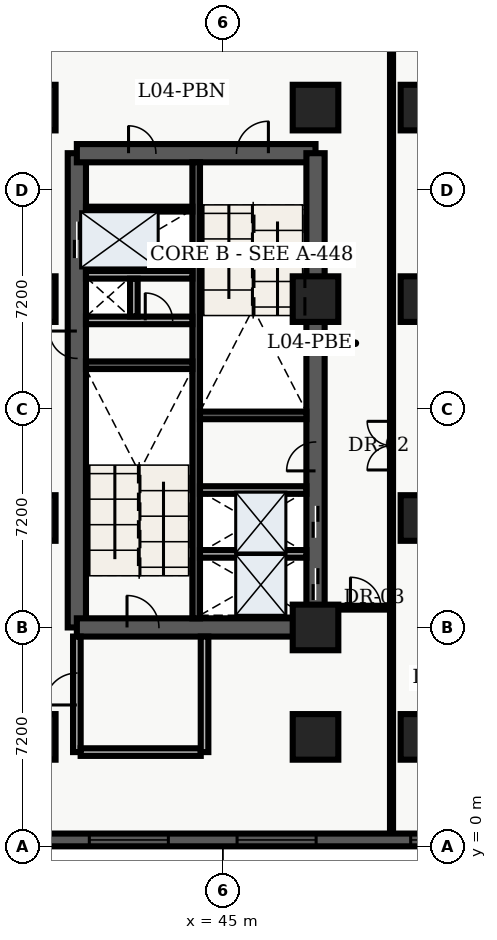
"""IFC4 building model, lengths in metres.
Left out: names, types, materials, properties, quantities, classifications, styles, units other than length and angle.
Written with IfcOpenShell. Run it as: python <this file> out.ifc"""

import sys

from ifc_helpers import new_model, entity, si_unit, converted_unit, direction, frame, origin_with_axes, origin_2d_with_axis, place, context, subcontext, project, spatial, polyline, rectangle, outline, extrude, element, fill, save


model = new_model("IFC4")
c1 = context("Model", 3, precision=1e-05, world=origin_with_axes(), true_north=direction((0.0, 1.0)))
c2 = subcontext(c1, "Body", "Model", "MODEL_VIEW")
j1 = project(units=[si_unit("LENGTHUNIT", "METRE"), converted_unit("PLANEANGLEUNIT", "DEGREE", entity("IfcPlaneAngleMeasure", 0.017), si_unit("PLANEANGLEUNIT", "RADIAN"), dimensions=[0, 0, 0, 0, 0, 0, 0])], contexts=[c1])
p1 = place(None, origin_with_axes())
s1 = spatial("IfcSite", under=j1, at=p1, CompositionType="ELEMENT")
p2 = place(p1, origin_with_axes())
s2 = spatial("IfcBuilding", under=s1, at=p2, CompositionType="ELEMENT")
p3 = place(p2, frame((0.0, 0.0, 19.8), z_axis=(0.0, 0.0, 1.0), x_axis=(1.0, 0.0, 0.0)))
s3 = spatial("IfcBuildingStorey", under=s2, at=p3, CompositionType="ELEMENT", Elevation=19.8)
p4 = place(p3, frame((40.2, 7.2, 0.0), z_axis=(0.0, 0.0, 1.0), x_axis=(0.0, 1.0, 0.0)))
e1 = element("IfcWall", 1, at=p4, inside=s3, PredefinedType="SHEAR", context=c2, shape_type="SweptSolid", body=[
    extrude(outline(polyline([(0.0, -0.3), (15.6, -0.3), (15.6, 0.3), (0.0, 0.3), (0.0, -0.3)])), origin_with_axes(), (0.0, 0.0, 1.0), 4.26),
])
p5 = place(p4, frame((12.75, 0.0, 0.0), z_axis=(0.0, 0.0, 1.0), x_axis=(1.0, 0.0, 0.0)))
e2 = element("IfcOpeningElement", 2, at=p5, cuts=e1, PredefinedType="OPENING", context=c2, shape_type="SweptSolid", body=[
    extrude(rectangle(XDim=1.2, YDim=0.62, at=origin_2d_with_axis()), origin_with_axes(), (0.0, 0.0, 1.0), 2.15),
])
p6 = place(p4, frame((9.3, 0.0, 0.0), z_axis=(0.0, 0.0, 1.0), x_axis=(1.0, 0.0, 0.0)))
e3 = element("IfcOpeningElement", 3, at=p6, cuts=e1, PredefinedType="OPENING", context=c2, shape_type="SweptSolid", body=[
    extrude(rectangle(XDim=0.9, YDim=0.62, at=origin_2d_with_axis()), origin_with_axes(), (0.0, 0.0, 1.0), 2.15),
])
p7 = place(p3, frame((40.2, 7.2, 0.0), z_axis=(0.0, 0.0, 1.0), x_axis=(1.0, 0.0, 0.0)))
e4 = element("IfcWall", 4, at=p7, inside=s3, PredefinedType="SHEAR", context=c2, shape_type="SweptSolid", body=[
    extrude(outline(polyline([(0.0, -0.3), (7.85, -0.3), (7.85, 0.3), (0.0, 0.3), (0.0, -0.3)])), origin_with_axes(), (0.0, 0.0, 1.0), 4.26),
])
p8 = place(p7, frame((2.175, 0.0, 0.0), z_axis=(0.0, 0.0, 1.0), x_axis=(1.0, 0.0, 0.0)))
e5 = element("IfcOpeningElement", 5, at=p8, cuts=e4, PredefinedType="OPENING", context=c2, shape_type="SweptSolid", body=[
    extrude(rectangle(XDim=1.05, YDim=0.62, at=origin_2d_with_axis()), origin_with_axes(), (0.0, 0.0, 1.0), 2.15),
])
p9 = place(p3, frame((40.2, 22.8, 0.0), z_axis=(0.0, 0.0, 1.0), x_axis=(1.0, 0.0, 0.0)))
e6 = element("IfcWall", 6, at=p9, inside=s3, PredefinedType="SHEAR", context=c2, shape_type="SweptSolid", body=[
    extrude(outline(polyline([(0.0, -0.3), (7.85, -0.3), (7.85, 0.3), (0.0, 0.3), (0.0, -0.3)])), origin_with_axes(), (0.0, 0.0, 1.0), 4.26),
])
p10 = place(p9, frame((5.775, 0.0, 0.0), z_axis=(0.0, 0.0, 1.0), x_axis=(1.0, 0.0, 0.0)))
e7 = element("IfcOpeningElement", 7, at=p10, cuts=e6, PredefinedType="OPENING", context=c2, shape_type="SweptSolid", body=[
    extrude(rectangle(XDim=1.05, YDim=0.62, at=origin_2d_with_axis()), origin_with_axes(), (0.0, 0.0, 1.0), 2.15),
])
p11 = place(p9, frame((2.15, 0.0, 0.0), z_axis=(0.0, 0.0, 1.0), x_axis=(1.0, 0.0, 0.0)))
e8 = element("IfcOpeningElement", 8, at=p11, cuts=e6, PredefinedType="OPENING", context=c2, shape_type="SweptSolid", body=[
    extrude(rectangle(XDim=0.9, YDim=0.62, at=origin_2d_with_axis()), origin_with_axes(), (0.0, 0.0, 1.0), 2.15),
])
p12 = place(p3, frame((48.05, 7.2, 0.0), z_axis=(0.0, 0.0, 1.0), x_axis=(0.0, 1.0, 0.0)))
e9 = element("IfcWall", 9, at=p12, inside=s3, PredefinedType="SHEAR", context=c2, shape_type="SweptSolid", body=[
    extrude(outline(polyline([(0.0, -0.3), (15.6, -0.3), (15.6, 0.3), (0.0, 0.3), (0.0, -0.3)])), origin_with_axes(), (0.0, 0.0, 1.0), 4.26),
])
p13 = place(p12, frame((1.425, 0.0, 0.0), z_axis=(0.0, 0.0, 1.0), x_axis=(1.0, 0.0, 0.0)))
e10 = element("IfcOpeningElement", 10, at=p13, cuts=e9, PredefinedType="OPENING", context=c2, shape_type="SweptSolid", body=[
    extrude(rectangle(XDim=1.05, YDim=0.62, at=origin_2d_with_axis()), origin_with_axes(), (0.0, 0.0, 1.0), 2.15),
])
p14 = place(p12, frame((3.475, 0.0, 0.0), z_axis=(0.0, 0.0, 1.0), x_axis=(1.0, 0.0, 0.0)))
e11 = element("IfcOpeningElement", 11, at=p14, cuts=e9, PredefinedType="OPENING", context=c2, shape_type="SweptSolid", body=[
    extrude(rectangle(XDim=1.05, YDim=0.62, at=origin_2d_with_axis()), origin_with_axes(), (0.0, 0.0, 1.0), 2.15),
])
p15 = place(p12, frame((5.625, 0.0, 0.0), z_axis=(0.0, 0.0, 1.0), x_axis=(1.0, 0.0, 0.0)))
e12 = element("IfcOpeningElement", 12, at=p15, cuts=e9, PredefinedType="OPENING", context=c2, shape_type="SweptSolid", body=[
    extrude(rectangle(XDim=0.95, YDim=0.62, at=origin_2d_with_axis()), origin_with_axes(), (0.0, 0.0, 1.0), 2.15),
])
p16 = place(p3, frame((44.125, 7.5, 0.0), z_axis=(0.0, 0.0, 1.0), x_axis=(0.0, 1.0, 0.0)))
e13 = element("IfcWall", 13, at=p16, inside=s3, PredefinedType="SHEAR", context=c2, shape_type="SweptSolid", body=[
    extrude(outline(polyline([(0.0, -0.125), (15.0, -0.125), (15.0, 0.125), (0.0, 0.125), (0.0, -0.125)])), origin_with_axes(), (0.0, 0.0, 1.0), 4.26),
])
for number, where, z_axis, x_axis in (
    (14, (40.5, 15.825, 0.0), (0.0, 0.0, 1.0), (1.0, 0.0, 0.0)),
    (15, (44.25, 14.175, 0.0), (0.0, 0.0, 1.0), (1.0, 0.0, 0.0)),
):
    element("IfcWall", number, at=place(p3, frame(where, z_axis=z_axis, x_axis=x_axis)), inside=s3, PredefinedType="SHEAR", context=c2, shape_type="SweptSolid", body=[
        extrude(outline(polyline([(0.0, -0.125), (3.5, -0.125), (3.5, 0.125), (0.0, 0.125), (0.0, -0.125)])), origin_with_axes(), (0.0, 0.0, 1.0), 4.26),
    ])
p17 = place(p3, frame((40.5, 17.3, 0.0), z_axis=(0.0, 0.0, 1.0), x_axis=(1.0, 0.0, 0.0)))
e16 = element("IfcWall", 16, at=p17, inside=s3, PredefinedType="SOLIDWALL", context=c2, shape_type="SweptSolid", body=[
    extrude(outline(polyline([(0.0, -0.125), (3.5, -0.125), (3.5, 0.125), (0.0, 0.125), (0.0, -0.125)])), origin_with_axes(), (0.0, 0.0, 1.0), 3.3),
])
p18 = place(p17, frame((2.4, 0.0, 0.0), z_axis=(0.0, 0.0, 1.0), x_axis=(1.0, 0.0, 0.0)))
e17 = element("IfcOpeningElement", 17, at=p18, cuts=e16, PredefinedType="OPENING", context=c2, shape_type="SweptSolid", body=[
    extrude(rectangle(XDim=0.9, YDim=0.27, at=origin_2d_with_axis()), origin_with_axes(), (0.0, 0.0, 1.0), 2.15),
])
p19 = place(p3, frame((40.5, 18.8, 0.0), z_axis=(0.0, 0.0, 1.0), x_axis=(1.0, 0.0, 0.0)))
e18 = element("IfcWall", 18, at=p19, inside=s3, PredefinedType="SOLIDWALL", context=c2, shape_type="SweptSolid", body=[
    extrude(outline(polyline([(0.0, -0.125), (3.5, -0.125), (3.5, 0.125), (0.0, 0.125), (0.0, -0.125)])), origin_with_axes(), (0.0, 0.0, 1.0), 3.3),
])
p20 = place(p3, frame((42.075, 17.43, 0.0), z_axis=(0.0, 0.0, 1.0), x_axis=(0.0, 1.0, 0.0)))
e19 = element("IfcWall", 19, at=p20, inside=s3, PredefinedType="SOLIDWALL", context=c2, shape_type="SweptSolid", body=[
    extrude(outline(polyline([(0.0, -0.125), (1.24, -0.125), (1.24, 0.125), (0.0, 0.125), (0.0, -0.125)])), origin_with_axes(), (0.0, 0.0, 1.0), 3.3),
])
p21 = place(p3, frame((40.2, 3.1, 0.0), z_axis=(0.0, 0.0, 1.0), x_axis=(0.0, 1.0, 0.0)))
e20 = element("IfcWall", 20, at=p21, inside=s3, PredefinedType="SOLIDWALL", context=c2, shape_type="SweptSolid", body=[
    extrude(outline(polyline([(0.0, -0.125), (3.8, -0.125), (3.8, 0.125), (0.0, 0.125), (0.0, -0.125)])), origin_with_axes(), (0.0, 0.0, 1.0), 3.3),
])
p22 = place(p21, frame((2.075, 0.0, 0.0), z_axis=(0.0, 0.0, 1.0), x_axis=(1.0, 0.0, 0.0)))
e21 = element("IfcOpeningElement", 21, at=p22, cuts=e20, PredefinedType="OPENING", context=c2, shape_type="SweptSolid", body=[
    extrude(rectangle(XDim=1.05, YDim=0.27, at=origin_2d_with_axis()), origin_with_axes(), (0.0, 0.0, 1.0), 2.15),
])
p23 = place(p3, frame((40.325, 3.1, 0.0), z_axis=(0.0, 0.0, 1.0), x_axis=(1.0, 0.0, 0.0)))
e22 = element("IfcWall", 22, at=p23, inside=s3, PredefinedType="SOLIDWALL", context=c2, shape_type="SweptSolid", body=[
    extrude(outline(polyline([(0.0, -0.125), (3.95, -0.125), (3.95, 0.125), (0.0, 0.125), (0.0, -0.125)])), origin_with_axes(), (0.0, 0.0, 1.0), 3.3),
])
p24 = place(p3, frame((44.4, 3.1, 0.0), z_axis=(0.0, 0.0, 1.0), x_axis=(0.0, 1.0, 0.0)))
e23 = element("IfcWall", 23, at=p24, inside=s3, PredefinedType="SOLIDWALL", context=c2, shape_type="SweptSolid", body=[
    extrude(outline(polyline([(0.0, -0.125), (3.8, -0.125), (3.8, 0.125), (0.0, 0.125), (0.0, -0.125)])), origin_with_axes(), (0.0, 0.0, 1.0), 3.3),
])
for number, where, z_axis, x_axis in (
    (24, (38.75, 3.6, 0.0), (0.0, 0.0, 1.0), (1.0, 0.0, 0.0)),
    (25, (38.75, 10.8, 0.0), (0.0, 0.0, 1.0), (1.0, 0.0, 0.0)),
    (26, (38.75, 18.0, 0.0), (0.0, 0.0, 1.0), (1.0, 0.0, 0.0)),
    (27, (38.75, 24.3, 0.0), (0.0, 0.0, 1.0), (1.0, 0.0, 0.0)),
    (28, (48.05, 3.6, 0.0), (0.0, 0.0, 1.0), (1.0, 0.0, 0.0)),
    (29, (48.05, 7.2, 0.0), (0.0, 0.0, 1.0), (1.0, 0.0, 0.0)),
    (30, (48.05, 18.0, 0.0), (0.0, 0.0, 1.0), (1.0, 0.0, 0.0)),
    (31, (48.05, 24.3, 0.0), (0.0, 0.0, 1.0), (1.0, 0.0, 0.0)),
    (32, (51.6, 3.6, 0.0), (0.0, 0.0, 1.0), (1.0, 0.0, 0.0)),
    (33, (51.6, 10.8, 0.0), (0.0, 0.0, 1.0), (1.0, 0.0, 0.0)),
    (34, (51.6, 18.0, 0.0), (0.0, 0.0, 1.0), (1.0, 0.0, 0.0)),
    (35, (51.6, 24.3, 0.0), (0.0, 0.0, 1.0), (1.0, 0.0, 0.0)),
):
    element("IfcColumn", number, at=place(p3, frame(where, z_axis=z_axis, x_axis=x_axis)), inside=s3, PredefinedType="COLUMN", context=c2, shape_type="SweptSolid", body=[
        extrude(rectangle(XDim=1.5, YDim=1.5, at=origin_2d_with_axis()), origin_with_axes(), (0.0, 0.0, 1.0), 4.5),
    ])
p25 = place(p3, frame((40.5, 20.96, 0.0), z_axis=(0.0, 0.0, 1.0), x_axis=(1.0, 0.0, 0.0)))
e36 = element("IfcWall", 36, at=p25, inside=s3, PredefinedType="PARTITIONING", context=c2, shape_type="SweptSolid", body=[
    extrude(outline(polyline([(0.0, -0.08), (3.5, -0.08), (3.5, 0.08), (0.0, 0.08), (0.0, -0.08)])), origin_with_axes(), (0.0, 0.0, 1.0), 3.2),
])
for number, where, z_axis, x_axis in (
    (37, (44.25, 9.62, 0.0), (0.0, 0.0, 1.0), (1.0, 0.0, 0.0)),
    (38, (44.25, 11.72, 0.0), (0.0, 0.0, 1.0), (1.0, 0.0, 0.0)),
):
    element("IfcWall", number, at=place(p3, frame(where, z_axis=z_axis, x_axis=x_axis)), inside=s3, PredefinedType="SOLIDWALL", context=c2, shape_type="SweptSolid", body=[
        extrude(outline(polyline([(0.0, -0.125), (3.5, -0.125), (3.5, 0.125), (0.0, 0.125), (0.0, -0.125)])), origin_with_axes(), (0.0, 0.0, 1.0), 3.2),
    ])
p26 = place(p3, frame((50.55, 0.38, 0.0), z_axis=(0.0, 0.0, 1.0), x_axis=(0.0, 1.0, 0.0)))
e39 = element("IfcWall", 39, at=p26, inside=s3, PredefinedType="PARTITIONING", context=c2, shape_type="SweptSolid", body=[
    extrude(outline(polyline([(0.0, -0.05), (35.24, -0.05), (35.24, 0.05), (0.0, 0.05), (0.0, -0.05)])), origin_with_axes(), (0.0, 0.0, 1.0), 3.2),
])
p27 = place(p26, frame((12.8, 0.0, 0.0), z_axis=(0.0, 0.0, 1.0), x_axis=(1.0, 0.0, 0.0)))
e40 = element("IfcOpeningElement", 40, at=p27, cuts=e39, PredefinedType="OPENING", context=c2, shape_type="SweptSolid", body=[
    extrude(rectangle(XDim=1.6, YDim=0.12, at=origin_2d_with_axis()), origin_with_axes(), (0.0, 0.0, 1.0), 2.2),
])
p28 = place(p26, frame((27.8, 0.0, 0.0), z_axis=(0.0, 0.0, 1.0), x_axis=(1.0, 0.0, 0.0)))
e41 = element("IfcOpeningElement", 41, at=p28, cuts=e39, PredefinedType="OPENING", context=c2, shape_type="SweptSolid", body=[
    extrude(rectangle(XDim=1.6, YDim=0.12, at=origin_2d_with_axis()), origin_with_axes(), (0.0, 0.0, 1.0), 2.2),
])
p29 = place(p3, frame((48.05, 7.85, 0.0), z_axis=(0.0, 0.0, 1.0), x_axis=(1.0, 0.0, 0.0)))
e42 = element("IfcWall", 42, at=p29, inside=s3, PredefinedType="PARTITIONING", context=c2, shape_type="SweptSolid", body=[
    extrude(outline(polyline([(0.0, -0.062), (2.5, -0.062), (2.5, 0.062), (0.0, 0.062), (0.0, -0.062)])), origin_with_axes(), (0.0, 0.0, 1.0), 3.2),
])
p30 = place(p29, frame((1.65, 0.0, 0.0), z_axis=(0.0, 0.0, 1.0), x_axis=(1.0, 0.0, 0.0)))
e43 = element("IfcOpeningElement", 43, at=p30, cuts=e42, PredefinedType="OPENING", context=c2, shape_type="SweptSolid", body=[
    extrude(rectangle(XDim=1.0, YDim=0.145, at=origin_2d_with_axis()), origin_with_axes(), (0.0, 0.0, 1.0), 2.15),
])
p31 = place(p3, frame((64.38, 0.21, 0.0), z_axis=(0.0, 0.0, 1.0), x_axis=(-1.0, 0.0, 0.0)))
e44 = element("IfcWall", 44, at=p31, inside=s3, PredefinedType="SOLIDWALL", context=c2, shape_type="SweptSolid", body=[
    extrude(outline(polyline([(0.0, -0.21), (64.38, -0.21), (64.38, 0.21), (0.0, 0.21), (0.0, -0.21)])), origin_with_axes(), (0.0, 0.0, 1.0), 4.26),
])
p32 = place(p31, frame((3.03, 0.0, 0.45), z_axis=(0.0, 0.0, 1.0), x_axis=(1.0, 0.0, 0.0)))
e45 = element("IfcOpeningElement", 45, at=p32, cuts=e44, PredefinedType="OPENING", context=c2, shape_type="SweptSolid", body=[
    extrude(rectangle(XDim=2.6, YDim=0.44, at=origin_2d_with_axis()), origin_with_axes(), (0.0, 0.0, 1.0), 2.8),
])
p33 = place(p31, frame((7.89, 0.0, 0.45), z_axis=(0.0, 0.0, 1.0), x_axis=(1.0, 0.0, 0.0)))
e46 = element("IfcOpeningElement", 46, at=p33, cuts=e44, PredefinedType="OPENING", context=c2, shape_type="SweptSolid", body=[
    extrude(rectangle(XDim=2.6, YDim=0.44, at=origin_2d_with_axis()), origin_with_axes(), (0.0, 0.0, 1.0), 2.8),
])
p34 = place(p31, frame((11.9, 0.0, 0.45), z_axis=(0.0, 0.0, 1.0), x_axis=(1.0, 0.0, 0.0)))
e47 = element("IfcOpeningElement", 47, at=p34, cuts=e44, PredefinedType="OPENING", context=c2, shape_type="SweptSolid", body=[
    extrude(rectangle(XDim=2.6, YDim=0.44, at=origin_2d_with_axis()), origin_with_axes(), (0.0, 0.0, 1.0), 2.8),
])
p35 = place(p31, frame((17.61, 0.0, 0.45), z_axis=(0.0, 0.0, 1.0), x_axis=(1.0, 0.0, 0.0)))
e48 = element("IfcOpeningElement", 48, at=p35, cuts=e44, PredefinedType="OPENING", context=c2, shape_type="SweptSolid", body=[
    extrude(rectangle(XDim=2.6, YDim=0.44, at=origin_2d_with_axis()), origin_with_axes(), (0.0, 0.0, 1.0), 2.8),
])
p36 = place(p31, frame((22.47, 0.0, 0.45), z_axis=(0.0, 0.0, 1.0), x_axis=(1.0, 0.0, 0.0)))
e49 = element("IfcOpeningElement", 49, at=p36, cuts=e44, PredefinedType="OPENING", context=c2, shape_type="SweptSolid", body=[
    extrude(rectangle(XDim=2.6, YDim=0.44, at=origin_2d_with_axis()), origin_with_axes(), (0.0, 0.0, 1.0), 2.8),
])
p37 = place(p31, frame((27.33, 0.0, 0.45), z_axis=(0.0, 0.0, 1.0), x_axis=(1.0, 0.0, 0.0)))
e50 = element("IfcOpeningElement", 50, at=p37, cuts=e44, PredefinedType="OPENING", context=c2, shape_type="SweptSolid", body=[
    extrude(rectangle(XDim=2.6, YDim=0.44, at=origin_2d_with_axis()), origin_with_axes(), (0.0, 0.0, 1.0), 2.8),
])
p38 = place(p31, frame((32.19, 0.0, 0.45), z_axis=(0.0, 0.0, 1.0), x_axis=(1.0, 0.0, 0.0)))
e51 = element("IfcOpeningElement", 51, at=p38, cuts=e44, PredefinedType="OPENING", context=c2, shape_type="SweptSolid", body=[
    extrude(rectangle(XDim=2.6, YDim=0.44, at=origin_2d_with_axis()), origin_with_axes(), (0.0, 0.0, 1.0), 2.8),
])
p39 = place(p31, frame((37.05, 0.0, 0.45), z_axis=(0.0, 0.0, 1.0), x_axis=(1.0, 0.0, 0.0)))
e52 = element("IfcOpeningElement", 52, at=p39, cuts=e44, PredefinedType="OPENING", context=c2, shape_type="SweptSolid", body=[
    extrude(rectangle(XDim=2.6, YDim=0.44, at=origin_2d_with_axis()), origin_with_axes(), (0.0, 0.0, 1.0), 2.8),
])
p40 = place(p31, frame((41.06, 0.0, 0.45), z_axis=(0.0, 0.0, 1.0), x_axis=(1.0, 0.0, 0.0)))
e53 = element("IfcOpeningElement", 53, at=p40, cuts=e44, PredefinedType="OPENING", context=c2, shape_type="SweptSolid", body=[
    extrude(rectangle(XDim=2.6, YDim=0.44, at=origin_2d_with_axis()), origin_with_axes(), (0.0, 0.0, 1.0), 2.8),
])
p41 = place(p31, frame((46.77, 0.0, 0.45), z_axis=(0.0, 0.0, 1.0), x_axis=(1.0, 0.0, 0.0)))
e54 = element("IfcOpeningElement", 54, at=p41, cuts=e44, PredefinedType="OPENING", context=c2, shape_type="SweptSolid", body=[
    extrude(rectangle(XDim=2.6, YDim=0.44, at=origin_2d_with_axis()), origin_with_axes(), (0.0, 0.0, 1.0), 2.8),
])
p42 = place(p31, frame((50.78, 0.0, 0.45), z_axis=(0.0, 0.0, 1.0), x_axis=(1.0, 0.0, 0.0)))
e55 = element("IfcOpeningElement", 55, at=p42, cuts=e44, PredefinedType="OPENING", context=c2, shape_type="SweptSolid", body=[
    extrude(rectangle(XDim=2.6, YDim=0.44, at=origin_2d_with_axis()), origin_with_axes(), (0.0, 0.0, 1.0), 2.8),
])
p43 = place(p31, frame((56.49, 0.0, 0.45), z_axis=(0.0, 0.0, 1.0), x_axis=(1.0, 0.0, 0.0)))
e56 = element("IfcOpeningElement", 56, at=p43, cuts=e44, PredefinedType="OPENING", context=c2, shape_type="SweptSolid", body=[
    extrude(rectangle(XDim=2.6, YDim=0.44, at=origin_2d_with_axis()), origin_with_axes(), (0.0, 0.0, 1.0), 2.8),
])
p44 = place(p31, frame((61.35, 0.0, 0.45), z_axis=(0.0, 0.0, 1.0), x_axis=(1.0, 0.0, 0.0)))
e57 = element("IfcOpeningElement", 57, at=p44, cuts=e44, PredefinedType="OPENING", context=c2, shape_type="SweptSolid", body=[
    extrude(rectangle(XDim=2.6, YDim=0.44, at=origin_2d_with_axis()), origin_with_axes(), (0.0, 0.0, 1.0), 2.8),
])
p45 = place(p12, frame((1.425, 0.0, 0.0), z_axis=(0.0, 0.0, 1.0), x_axis=(1.0, 0.0, 0.0)))
e58 = element("IfcDoor", 58, at=p45, inside=s3, OperationType="SLIDING_TO_LEFT", PredefinedType="DOOR", context=c2, shape_type="SweptSolid", body=[
    extrude(rectangle(XDim=1.05, YDim=0.09, at=origin_2d_with_axis()), origin_with_axes(), (0.0, 0.0, 1.0), 2.15),
])
fill(e10, e58)
p46 = place(p12, frame((3.475, 0.0, 0.0), z_axis=(0.0, 0.0, 1.0), x_axis=(1.0, 0.0, 0.0)))
e59 = element("IfcDoor", 59, at=p46, inside=s3, OperationType="SLIDING_TO_RIGHT", PredefinedType="DOOR", context=c2, shape_type="SweptSolid", body=[
    extrude(rectangle(XDim=1.05, YDim=0.09, at=origin_2d_with_axis()), origin_with_axes(), (0.0, 0.0, 1.0), 2.15),
])
fill(e11, e59)
p47 = place(p4, frame((12.75, 0.0, 0.0), z_axis=(0.0, 0.0, 1.0), x_axis=(1.0, 0.0, 0.0)))
e60 = element("IfcDoor", 60, at=p47, inside=s3, OperationType="DOUBLE_DOOR_SLIDING", PredefinedType="DOOR", context=c2, shape_type="SweptSolid", body=[
    extrude(rectangle(XDim=1.2, YDim=0.09, at=origin_2d_with_axis()), origin_with_axes(), (0.0, 0.0, 1.0), 2.15),
])
fill(e2, e60)
p48 = place(p4, frame((9.3, 0.0, 0.0), z_axis=(0.0, 0.0, 1.0), x_axis=(1.0, 0.0, 0.0)))
e61 = element("IfcDoor", 61, at=p48, inside=s3, OperationType="SINGLE_SWING_RIGHT", PredefinedType="DOOR", context=c2, shape_type="SweptSolid", body=[
    extrude(rectangle(XDim=0.9, YDim=0.09, at=origin_2d_with_axis()), origin_with_axes(), (0.0, 0.0, 1.0), 2.15),
])
fill(e3, e61)
p49 = place(p17, frame((2.4, 0.0, 0.0), z_axis=(0.0, 0.0, 1.0), x_axis=(1.0, 0.0, 0.0)))
e62 = element("IfcDoor", 62, at=p49, inside=s3, OperationType="SINGLE_SWING_LEFT", PredefinedType="DOOR", context=c2, shape_type="SweptSolid", body=[
    extrude(rectangle(XDim=0.9, YDim=0.09, at=origin_2d_with_axis()), origin_with_axes(), (0.0, 0.0, 1.0), 2.15),
])
fill(e17, e62)
p50 = place(p7, frame((2.175, 0.0, 0.0), z_axis=(0.0, 0.0, 1.0), x_axis=(1.0, 0.0, 0.0)))
e63 = element("IfcDoor", 63, at=p50, inside=s3, OperationType="SINGLE_SWING_LEFT", PredefinedType="DOOR", context=c2, shape_type="SweptSolid", body=[
    extrude(rectangle(XDim=1.05, YDim=0.09, at=origin_2d_with_axis()), origin_with_axes(), (0.0, 0.0, 1.0), 2.15),
])
fill(e5, e63)
p51 = place(p9, frame((5.775, 0.0, 0.0), z_axis=(0.0, 0.0, 1.0), x_axis=(1.0, 0.0, 0.0)))
e64 = element("IfcDoor", 64, at=p51, inside=s3, OperationType="SINGLE_SWING_RIGHT", PredefinedType="DOOR", context=c2, shape_type="SweptSolid", body=[
    extrude(rectangle(XDim=1.05, YDim=0.09, at=origin_2d_with_axis()), origin_with_axes(), (0.0, 0.0, 1.0), 2.15),
])
fill(e7, e64)
p52 = place(p21, frame((2.075, 0.0, 0.0), z_axis=(0.0, 0.0, 1.0), x_axis=(1.0, 0.0, 0.0)))
e65 = element("IfcDoor", 65, at=p52, inside=s3, OperationType="SINGLE_SWING_LEFT", PredefinedType="DOOR", context=c2, shape_type="SweptSolid", body=[
    extrude(rectangle(XDim=1.05, YDim=0.09, at=origin_2d_with_axis()), origin_with_axes(), (0.0, 0.0, 1.0), 2.15),
])
fill(e21, e65)
p53 = place(p9, frame((2.15, 0.0, 0.0), z_axis=(0.0, 0.0, 1.0), x_axis=(1.0, 0.0, 0.0)))
e66 = element("IfcDoor", 66, at=p53, inside=s3, OperationType="SINGLE_SWING_LEFT", PredefinedType="DOOR", context=c2, shape_type="SweptSolid", body=[
    extrude(rectangle(XDim=0.9, YDim=0.09, at=origin_2d_with_axis()), origin_with_axes(), (0.0, 0.0, 1.0), 2.15),
])
fill(e8, e66)
p54 = place(p12, frame((5.625, 0.0, 0.0), z_axis=(0.0, 0.0, 1.0), x_axis=(1.0, 0.0, 0.0)))
e67 = element("IfcDoor", 67, at=p54, inside=s3, OperationType="SINGLE_SWING_LEFT", PredefinedType="DOOR", context=c2, shape_type="SweptSolid", body=[
    extrude(rectangle(XDim=0.95, YDim=0.09, at=origin_2d_with_axis()), origin_with_axes(), (0.0, 0.0, 1.0), 2.15),
])
fill(e12, e67)
p55 = place(p29, frame((1.65, 0.0, 0.0), z_axis=(0.0, 0.0, 1.0), x_axis=(1.0, 0.0, 0.0)))
e68 = element("IfcDoor", 68, at=p55, inside=s3, OperationType="SINGLE_SWING_LEFT", PredefinedType="DOOR", context=c2, shape_type="SweptSolid", body=[
    extrude(rectangle(XDim=1.0, YDim=0.075, at=origin_2d_with_axis()), origin_with_axes(), (0.0, 0.0, 1.0), 2.15),
])
fill(e43, e68)
p56 = place(p26, frame((12.8, 0.0, 0.0), z_axis=(0.0, 0.0, 1.0), x_axis=(1.0, 0.0, 0.0)))
e69 = element("IfcDoor", 69, at=p56, inside=s3, OperationType="DOUBLE_DOOR_SINGLE_SWING", PredefinedType="DOOR", context=c2, shape_type="SweptSolid", body=[
    extrude(rectangle(XDim=1.6, YDim=0.06, at=origin_2d_with_axis()), origin_with_axes(), (0.0, 0.0, 1.0), 2.2),
])
fill(e40, e69)
p57 = place(p31, frame((11.9, 0.0, 0.45), z_axis=(0.0, 0.0, 1.0), x_axis=(1.0, 0.0, 0.0)))
e70 = element("IfcWindow", 70, at=p57, inside=s3, PredefinedType="WINDOW", context=c2, shape_type="SweptSolid", body=[
    extrude(rectangle(XDim=2.6, YDim=0.09, at=origin_2d_with_axis()), origin_with_axes(), (0.0, 0.0, 1.0), 2.8),
])
fill(e47, e70)
p58 = place(p31, frame((17.61, 0.0, 0.45), z_axis=(0.0, 0.0, 1.0), x_axis=(1.0, 0.0, 0.0)))
e71 = element("IfcWindow", 71, at=p58, inside=s3, PredefinedType="WINDOW", context=c2, shape_type="SweptSolid", body=[
    extrude(rectangle(XDim=2.6, YDim=0.09, at=origin_2d_with_axis()), origin_with_axes(), (0.0, 0.0, 1.0), 2.8),
])
fill(e48, e71)
p59 = place(p31, frame((22.47, 0.0, 0.45), z_axis=(0.0, 0.0, 1.0), x_axis=(1.0, 0.0, 0.0)))
e72 = element("IfcWindow", 72, at=p59, inside=s3, PredefinedType="WINDOW", context=c2, shape_type="SweptSolid", body=[
    extrude(rectangle(XDim=2.6, YDim=0.09, at=origin_2d_with_axis()), origin_with_axes(), (0.0, 0.0, 1.0), 2.8),
])
fill(e49, e72)
save(model, sys.argv[1])
